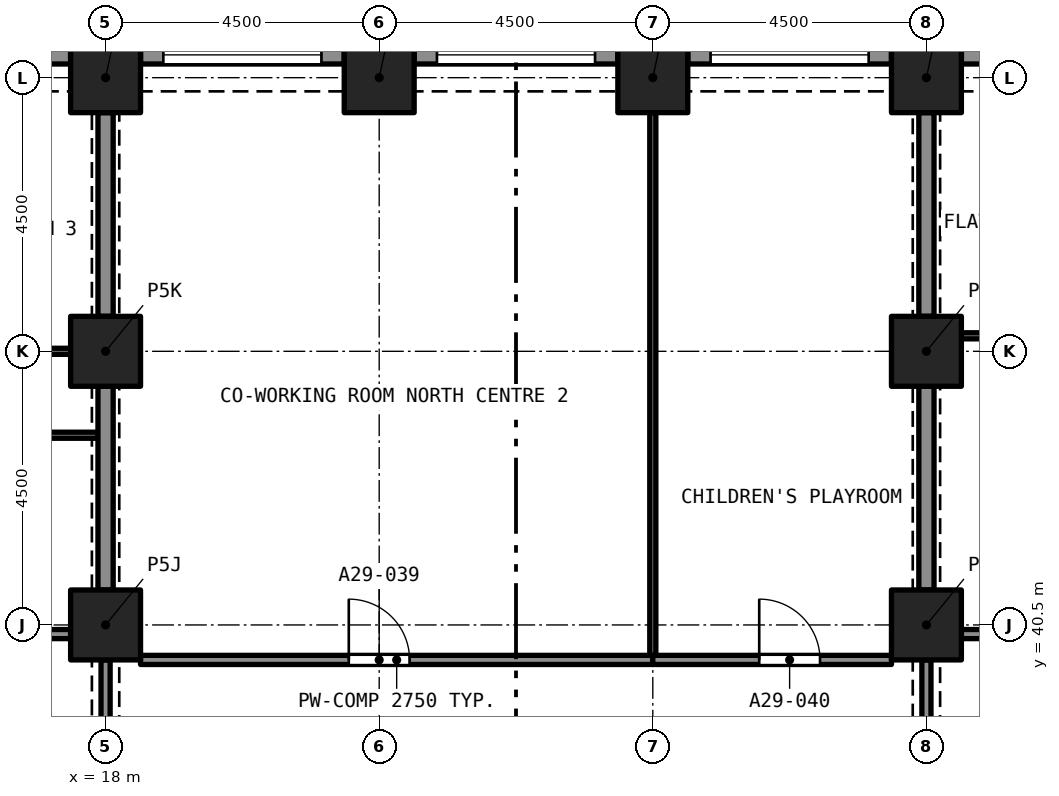
"""IFC4 building model, lengths in metres.
Left out: names, types, materials, properties, quantities, classifications, styles, units other than length and angle.
Written with IfcOpenShell. Run it as: python <this file> out.ifc"""

import sys

from ifc_helpers import new_model, si_unit, direction, frame, frame_2d, origin, origin_2d, place, context, subcontext, project, spatial, rectangle, extrude, element, fill, save


model = new_model("IFC4")
c1 = context("Model", 3, precision=1e-05, world=origin(), true_north=direction((0.0, 1.0)))
c2 = subcontext(c1, "Body", "Model", "MODEL_VIEW")
j1 = project(units=[si_unit("LENGTHUNIT", "METRE"), si_unit("PLANEANGLEUNIT", "RADIAN")], contexts=[c1])
p1 = place(None, origin())
s1 = spatial("IfcSite", under=j1, at=p1, CompositionType="ELEMENT")
p2 = place(p1, origin())
s2 = spatial("IfcBuilding", under=s1, at=p2, CompositionType="ELEMENT")
p3 = place(p2, frame((0.0, 0.0, 105.6)))
s3 = spatial("IfcBuildingStorey", under=s2, at=p3, CompositionType="ELEMENT", Elevation=105.6)
for number, where, z_axis, x_axis in (
    (1, (18.0, 40.5, 0.0), (0.0, 0.0, 1.0), (1.0, 0.0, 0.0)),
    (2, (31.5, 40.5, 0.0), (0.0, 0.0, 1.0), (1.0, 0.0, 0.0)),
    (3, (18.0, 45.0, 0.0), (0.0, 0.0, 1.0), (1.0, 0.0, 0.0)),
    (4, (31.5, 45.0, 0.0), (0.0, 0.0, 1.0), (1.0, 0.0, 0.0)),
    (5, (18.0, 49.5, 0.0), (0.0, 0.0, 1.0), (1.0, 0.0, 0.0)),
    (6, (22.5, 49.5, 0.0), (0.0, 0.0, 1.0), (1.0, 0.0, 0.0)),
    (7, (27.0, 49.5, 0.0), (0.0, 0.0, 1.0), (1.0, 0.0, 0.0)),
    (8, (31.5, 49.5, 0.0), (0.0, 0.0, 1.0), (1.0, 0.0, 0.0)),
):
    element("IfcColumn", number, at=place(p3, frame(where, z_axis=z_axis, x_axis=x_axis)), inside=s3, PredefinedType="COLUMN", context=c2, shape_type="SweptSolid", body=[
        extrude(rectangle(XDim=1.15, YDim=1.15, at=origin_2d()), origin(), (0.0, 0.0, 1.0), 3.2),
    ])
p4 = place(p3, frame((32.075, 49.875, 0.0), z_axis=(0.0, 0.0, 1.0), x_axis=(1.0, 0.0, 0.0)))
e9 = element("IfcWall", 9, at=p4, inside=s3, PredefinedType="SOLIDWALL", context=c2, shape_type="SweptSolid", body=[
    extrude(rectangle(XDim=3.35, YDim=0.3, at=frame_2d((1.675, 0.0))), origin(), (0.0, 0.0, 1.0), 3.2),
])
p5 = place(p4, frame((0.375, 0.0, 0.45)))
e10 = element("IfcOpeningElement", 10, at=p5, cuts=e9, PredefinedType="OPENING", context=c2, shape_type="SweptSolid", body=[
    extrude(rectangle(XDim=2.6, YDim=1.95, at=frame_2d((1.3, 0.975))), frame((0.0, 0.16, 0.0), z_axis=(0.0, -1.0, 0.0), x_axis=(1.0, 0.0, 0.0)), (0.0, 0.0, 1.0), 0.32),
])
p6 = place(p3, frame((27.575, 49.875, 0.0), z_axis=(0.0, 0.0, 1.0), x_axis=(1.0, 0.0, 0.0)))
e11 = element("IfcWall", 11, at=p6, inside=s3, PredefinedType="SOLIDWALL", context=c2, shape_type="SweptSolid", body=[
    extrude(rectangle(XDim=3.35, YDim=0.3, at=frame_2d((1.675, 0.0))), origin(), (0.0, 0.0, 1.0), 3.2),
])
p7 = place(p6, frame((0.375, 0.0, 0.45)))
e12 = element("IfcOpeningElement", 12, at=p7, cuts=e11, PredefinedType="OPENING", context=c2, shape_type="SweptSolid", body=[
    extrude(rectangle(XDim=2.6, YDim=1.95, at=frame_2d((1.3, 0.975))), frame((0.0, 0.16, 0.0), z_axis=(0.0, -1.0, 0.0), x_axis=(1.0, 0.0, 0.0)), (0.0, 0.0, 1.0), 0.32),
])
p8 = place(p3, frame((23.075, 49.875, 0.0), z_axis=(0.0, 0.0, 1.0), x_axis=(1.0, 0.0, 0.0)))
e13 = element("IfcWall", 13, at=p8, inside=s3, PredefinedType="SOLIDWALL", context=c2, shape_type="SweptSolid", body=[
    extrude(rectangle(XDim=3.35, YDim=0.3, at=frame_2d((1.675, 0.0))), origin(), (0.0, 0.0, 1.0), 3.2),
])
p9 = place(p8, frame((0.375, 0.0, 0.45)))
e14 = element("IfcOpeningElement", 14, at=p9, cuts=e13, PredefinedType="OPENING", context=c2, shape_type="SweptSolid", body=[
    extrude(rectangle(XDim=2.6, YDim=1.95, at=frame_2d((1.3, 0.975))), frame((0.0, 0.16, 0.0), z_axis=(0.0, -1.0, 0.0), x_axis=(1.0, 0.0, 0.0)), (0.0, 0.0, 1.0), 0.32),
])
p10 = place(p3, frame((18.575, 49.875, 0.0), z_axis=(0.0, 0.0, 1.0), x_axis=(1.0, 0.0, 0.0)))
e15 = element("IfcWall", 15, at=p10, inside=s3, PredefinedType="SOLIDWALL", context=c2, shape_type="SweptSolid", body=[
    extrude(rectangle(XDim=3.35, YDim=0.3, at=frame_2d((1.675, 0.0))), origin(), (0.0, 0.0, 1.0), 3.2),
])
p11 = place(p10, frame((0.375, 0.0, 0.45)))
e16 = element("IfcOpeningElement", 16, at=p11, cuts=e15, PredefinedType="OPENING", context=c2, shape_type="SweptSolid", body=[
    extrude(rectangle(XDim=2.6, YDim=1.95, at=frame_2d((1.3, 0.975))), frame((0.0, 0.16, 0.0), z_axis=(0.0, -1.0, 0.0), x_axis=(1.0, 0.0, 0.0)), (0.0, 0.0, 1.0), 0.32),
])
p12 = place(p3, frame((14.075, 49.875, 0.0), z_axis=(0.0, 0.0, 1.0), x_axis=(1.0, 0.0, 0.0)))
e17 = element("IfcWall", 17, at=p12, inside=s3, PredefinedType="SOLIDWALL", context=c2, shape_type="SweptSolid", body=[
    extrude(rectangle(XDim=3.35, YDim=0.3, at=frame_2d((1.675, 0.0))), origin(), (0.0, 0.0, 1.0), 3.2),
])
p13 = place(p12, frame((0.375, 0.0, 0.45)))
e18 = element("IfcOpeningElement", 18, at=p13, cuts=e17, PredefinedType="OPENING", context=c2, shape_type="SweptSolid", body=[
    extrude(rectangle(XDim=2.6, YDim=1.95, at=frame_2d((1.3, 0.975))), frame((0.0, 0.16, 0.0), z_axis=(0.0, -1.0, 0.0), x_axis=(1.0, 0.0, 0.0)), (0.0, 0.0, 1.0), 0.32),
])
p14 = place(p3, frame((13.5, 45.0, 0.0), z_axis=(0.0, 0.0, 1.0), x_axis=(1.0, 0.0, 0.0)))
e19 = element("IfcWall", 19, at=p14, inside=s3, PredefinedType="PARTITIONING", context=c2, shape_type="SweptSolid", body=[
    extrude(rectangle(XDim=3.925, YDim=0.1, at=frame_2d((1.962, 0.0))), origin(), (0.0, 0.0, 1.0), 2.9),
])
p15 = place(p14, frame((1.8, 0.0, 0.0)))
e20 = element("IfcOpeningElement", 20, at=p15, cuts=e19, PredefinedType="OPENING", context=c2, shape_type="SweptSolid", body=[
    extrude(rectangle(XDim=0.9, YDim=2.1, at=frame_2d((0.45, 1.05))), frame((0.0, 0.06, 0.0), z_axis=(0.0, -1.0, 0.0), x_axis=(1.0, 0.0, 0.0)), (0.0, 0.0, 1.0), 0.12),
])
p16 = place(p3, frame((18.0, 45.575, 0.0), z_axis=(0.0, 0.0, 1.0), x_axis=(0.0, 1.0, 0.0)))
e21 = element("IfcWall", 21, at=p16, inside=s3, PredefinedType="PARTITIONING", context=c2, shape_type="SweptSolid", body=[
    extrude(rectangle(XDim=3.35, YDim=0.25, at=frame_2d((1.675, 0.0))), origin(), (0.0, 0.0, 1.0), 2.38),
])
p17 = place(p3, frame((17.875, 43.62, 0.0), z_axis=(0.0, 0.0, 1.0), x_axis=(-1.0, 0.0, 0.0)))
e22 = element("IfcWall", 22, at=p17, inside=s3, PredefinedType="PARTITIONING", context=c2, shape_type="SweptSolid", body=[
    extrude(rectangle(XDim=6.23, YDim=0.1, at=frame_2d((3.115, 0.0))), origin(), (0.0, 0.0, 1.0), 2.9),
])
p18 = place(p17, frame((2.602, 0.0, 0.0)))
e23 = element("IfcOpeningElement", 23, at=p18, cuts=e22, PredefinedType="OPENING", context=c2, shape_type="SweptSolid", body=[
    extrude(rectangle(XDim=0.9, YDim=2.1, at=frame_2d((0.45, 1.05))), frame((0.0, 0.06, 0.0), z_axis=(0.0, -1.0, 0.0), x_axis=(1.0, 0.0, 0.0)), (0.0, 0.0, 1.0), 0.12),
])
p19 = place(p3, frame((18.0, 41.075, 0.0), z_axis=(0.0, 0.0, 1.0), x_axis=(0.0, 1.0, 0.0)))
e24 = element("IfcWall", 24, at=p19, inside=s3, PredefinedType="PARTITIONING", context=c2, shape_type="SweptSolid", body=[
    extrude(rectangle(XDim=3.35, YDim=0.25, at=frame_2d((1.675, 0.0))), origin(), (0.0, 0.0, 1.0), 2.38),
])
p20 = place(p3, frame((13.35, 40.35, 0.0), z_axis=(0.0, 0.0, 1.0), x_axis=(1.0, 0.0, 0.0)))
e25 = element("IfcWall", 25, at=p20, inside=s3, PredefinedType="PARTITIONING", context=c2, shape_type="SweptSolid", body=[
    extrude(rectangle(XDim=4.075, YDim=0.15, at=frame_2d((2.038, 0.0))), origin(), (0.0, 0.0, 1.0), 2.9),
])
p21 = place(p3, frame((32.075, 45.255, 0.0), z_axis=(0.0, 0.0, 1.0), x_axis=(1.0, 0.0, 0.0)))
e26 = element("IfcWall", 26, at=p21, inside=s3, PredefinedType="PARTITIONING", context=c2, shape_type="SweptSolid", body=[
    extrude(rectangle(XDim=3.925, YDim=0.1, at=frame_2d((1.962, 0.0))), origin(), (0.0, 0.0, 1.0), 2.9),
])
p22 = place(p21, frame((1.175, 0.0, 0.0)))
e27 = element("IfcOpeningElement", 27, at=p22, cuts=e26, PredefinedType="OPENING", context=c2, shape_type="SweptSolid", body=[
    extrude(rectangle(XDim=1.0, YDim=2.1, at=frame_2d((0.5, 1.05))), frame((0.0, 0.06, 0.0), z_axis=(0.0, -1.0, 0.0), x_axis=(1.0, 0.0, 0.0)), (0.0, 0.0, 1.0), 0.12),
])
p23 = place(p3, frame((31.5, 41.075, 0.0), z_axis=(0.0, 0.0, 1.0), x_axis=(0.0, 1.0, 0.0)))
e28 = element("IfcWall", 28, at=p23, inside=s3, PredefinedType="PARTITIONING", context=c2, shape_type="SweptSolid", body=[
    extrude(rectangle(XDim=3.35, YDim=0.25, at=frame_2d((1.675, 0.0))), origin(), (0.0, 0.0, 1.0), 2.38),
])
p24 = place(p3, frame((32.075, 40.35, 0.0), z_axis=(0.0, 0.0, 1.0), x_axis=(1.0, 0.0, 0.0)))
e29 = element("IfcWall", 29, at=p24, inside=s3, PredefinedType="PARTITIONING", context=c2, shape_type="SweptSolid", body=[
    extrude(rectangle(XDim=2.275, YDim=0.15, at=frame_2d((1.138, 0.0))), origin(), (0.0, 0.0, 1.0), 2.9),
])
p25 = place(p24, frame((1.145, 0.0, 0.0)))
e30 = element("IfcOpeningElement", 30, at=p25, cuts=e29, PredefinedType="OPENING", context=c2, shape_type="SweptSolid", body=[
    extrude(rectangle(XDim=1.0, YDim=2.1, at=frame_2d((0.5, 1.05))), frame((0.0, 0.085, 0.0), z_axis=(0.0, -1.0, 0.0), x_axis=(1.0, 0.0, 0.0)), (0.0, 0.0, 1.0), 0.17),
])
p26 = place(p3, frame((31.5, 45.575, 0.0), z_axis=(0.0, 0.0, 1.0), x_axis=(0.0, 1.0, 0.0)))
e31 = element("IfcWall", 31, at=p26, inside=s3, PredefinedType="PARTITIONING", context=c2, shape_type="SweptSolid", body=[
    extrude(rectangle(XDim=3.35, YDim=0.25, at=frame_2d((1.675, 0.0))), origin(), (0.0, 0.0, 1.0), 2.38),
])
p27 = place(p3, frame((18.575, 39.925, 0.0), z_axis=(0.0, 0.0, 1.0), x_axis=(1.0, 0.0, 0.0)))
e32 = element("IfcWall", 32, at=p27, inside=s3, PredefinedType="PARTITIONING", context=c2, shape_type="SweptSolid", body=[
    extrude(rectangle(XDim=8.425, YDim=0.15, at=frame_2d((4.212, 0.0))), origin(), (0.0, 0.0, 1.0), 2.75),
])
p28 = place(p27, frame((3.425, 0.0, 0.0)))
e33 = element("IfcOpeningElement", 33, at=p28, cuts=e32, PredefinedType="OPENING", context=c2, shape_type="SweptSolid", body=[
    extrude(rectangle(XDim=1.0, YDim=2.1, at=frame_2d((0.5, 1.05))), frame((0.0, 0.085, 0.0), z_axis=(0.0, -1.0, 0.0), x_axis=(1.0, 0.0, 0.0)), (0.0, 0.0, 1.0), 0.17),
])
p29 = place(p3, frame((27.0, 39.925, 0.0), z_axis=(0.0, 0.0, 1.0), x_axis=(1.0, 0.0, 0.0)))
e34 = element("IfcWall", 34, at=p29, inside=s3, PredefinedType="PARTITIONING", context=c2, shape_type="SweptSolid", body=[
    extrude(rectangle(XDim=3.925, YDim=0.15, at=frame_2d((1.962, 0.0))), origin(), (0.0, 0.0, 1.0), 2.75),
])
p30 = place(p29, frame((1.75, 0.0, 0.0)))
e35 = element("IfcOpeningElement", 35, at=p30, cuts=e34, PredefinedType="OPENING", context=c2, shape_type="SweptSolid", body=[
    extrude(rectangle(XDim=1.0, YDim=2.1, at=frame_2d((0.5, 1.05))), frame((0.0, 0.085, 0.0), z_axis=(0.0, -1.0, 0.0), x_axis=(1.0, 0.0, 0.0)), (0.0, 0.0, 1.0), 0.17),
])
p31 = place(p3, frame((31.5, 36.575, 0.0), z_axis=(0.0, 0.0, 1.0), x_axis=(0.0, 1.0, 0.0)))
e36 = element("IfcWall", 36, at=p31, inside=s3, PredefinedType="PARTITIONING", context=c2, shape_type="SweptSolid", body=[
    extrude(rectangle(XDim=3.35, YDim=0.15, at=frame_2d((1.675, 0.0))), origin(), (0.0, 0.0, 1.0), 2.38),
])
p32 = place(p31, frame((1.075, 0.0, 0.0)))
e37 = element("IfcOpeningElement", 37, at=p32, cuts=e36, PredefinedType="OPENING", context=c2, shape_type="SweptSolid", body=[
    extrude(rectangle(XDim=1.2, YDim=2.1, at=frame_2d((0.6, 1.05))), frame((0.0, 0.085, 0.0), z_axis=(0.0, -1.0, 0.0), x_axis=(1.0, 0.0, 0.0)), (0.0, 0.0, 1.0), 0.17),
])
p33 = place(p3, frame((18.0, 39.925, 0.0), z_axis=(0.0, 0.0, 1.0), x_axis=(0.0, -1.0, 0.0)))
e38 = element("IfcWall", 38, at=p33, inside=s3, PredefinedType="PARTITIONING", context=c2, shape_type="SweptSolid", body=[
    extrude(rectangle(XDim=3.35, YDim=0.15, at=frame_2d((1.675, 0.0))), origin(), (0.0, 0.0, 1.0), 2.38),
])
p34 = place(p33, frame((1.075, 0.0, 0.0)))
e39 = element("IfcOpeningElement", 39, at=p34, cuts=e38, PredefinedType="OPENING", context=c2, shape_type="SweptSolid", body=[
    extrude(rectangle(XDim=1.2, YDim=2.1, at=frame_2d((0.6, 1.05))), frame((0.0, 0.085, 0.0), z_axis=(0.0, -1.0, 0.0), x_axis=(1.0, 0.0, 0.0)), (0.0, 0.0, 1.0), 0.17),
])
p35 = place(p3, frame((27.0, 40.0, 0.0), z_axis=(0.0, 0.0, 1.0), x_axis=(0.0, 1.0, 0.0)))
e40 = element("IfcWall", 40, at=p35, inside=s3, PredefinedType="PARTITIONING", context=c2, shape_type="SweptSolid", body=[
    extrude(rectangle(XDim=8.925, YDim=0.1, at=frame_2d((4.462, 0.0))), origin(), (0.0, 0.0, 1.0), 2.75),
])
p36 = place(p7, origin())
e41 = element("IfcWindow", 41, at=p36, inside=s3, PartitioningType="SINGLE_PANEL", PredefinedType="WINDOW", context=c2, shape_type="SweptSolid", body=[
    extrude(rectangle(XDim=2.6, YDim=1.95, at=frame_2d((1.3, 0.975))), frame((0.0, 0.03, 0.0), z_axis=(0.0, -1.0, 0.0), x_axis=(1.0, 0.0, 0.0)), (0.0, 0.0, 1.0), 0.06),
])
fill(e12, e41)
p37 = place(p9, origin())
e42 = element("IfcWindow", 42, at=p37, inside=s3, PartitioningType="SINGLE_PANEL", PredefinedType="WINDOW", context=c2, shape_type="SweptSolid", body=[
    extrude(rectangle(XDim=2.6, YDim=1.95, at=frame_2d((1.3, 0.975))), frame((0.0, 0.03, 0.0), z_axis=(0.0, -1.0, 0.0), x_axis=(1.0, 0.0, 0.0)), (0.0, 0.0, 1.0), 0.06),
])
fill(e14, e42)
p38 = place(p11, origin())
e43 = element("IfcWindow", 43, at=p38, inside=s3, PartitioningType="SINGLE_PANEL", PredefinedType="WINDOW", context=c2, shape_type="SweptSolid", body=[
    extrude(rectangle(XDim=2.6, YDim=1.95, at=frame_2d((1.3, 0.975))), frame((0.0, 0.03, 0.0), z_axis=(0.0, -1.0, 0.0), x_axis=(1.0, 0.0, 0.0)), (0.0, 0.0, 1.0), 0.06),
])
fill(e16, e43)
p39 = place(p28, origin())
e44 = element("IfcDoor", 44, at=p39, inside=s3, OperationType="SINGLE_SWING_LEFT", PredefinedType="DOOR", context=c2, shape_type="SweptSolid", body=[
    extrude(rectangle(XDim=1.0, YDim=2.1, at=frame_2d((0.5, 1.05))), frame((0.0, 0.025, 0.0), z_axis=(0.0, -1.0, 0.0), x_axis=(1.0, 0.0, 0.0)), (0.0, 0.0, 1.0), 0.05),
])
fill(e33, e44)
p40 = place(p30, origin())
e45 = element("IfcDoor", 45, at=p40, inside=s3, OperationType="SINGLE_SWING_RIGHT", PredefinedType="DOOR", context=c2, shape_type="SweptSolid", body=[
    extrude(rectangle(XDim=1.0, YDim=2.1, at=frame_2d((0.5, 1.05))), frame((0.0, 0.025, 0.0), z_axis=(0.0, -1.0, 0.0), x_axis=(1.0, 0.0, 0.0)), (0.0, 0.0, 1.0), 0.05),
])
fill(e35, e45)
save(model, sys.argv[1])
